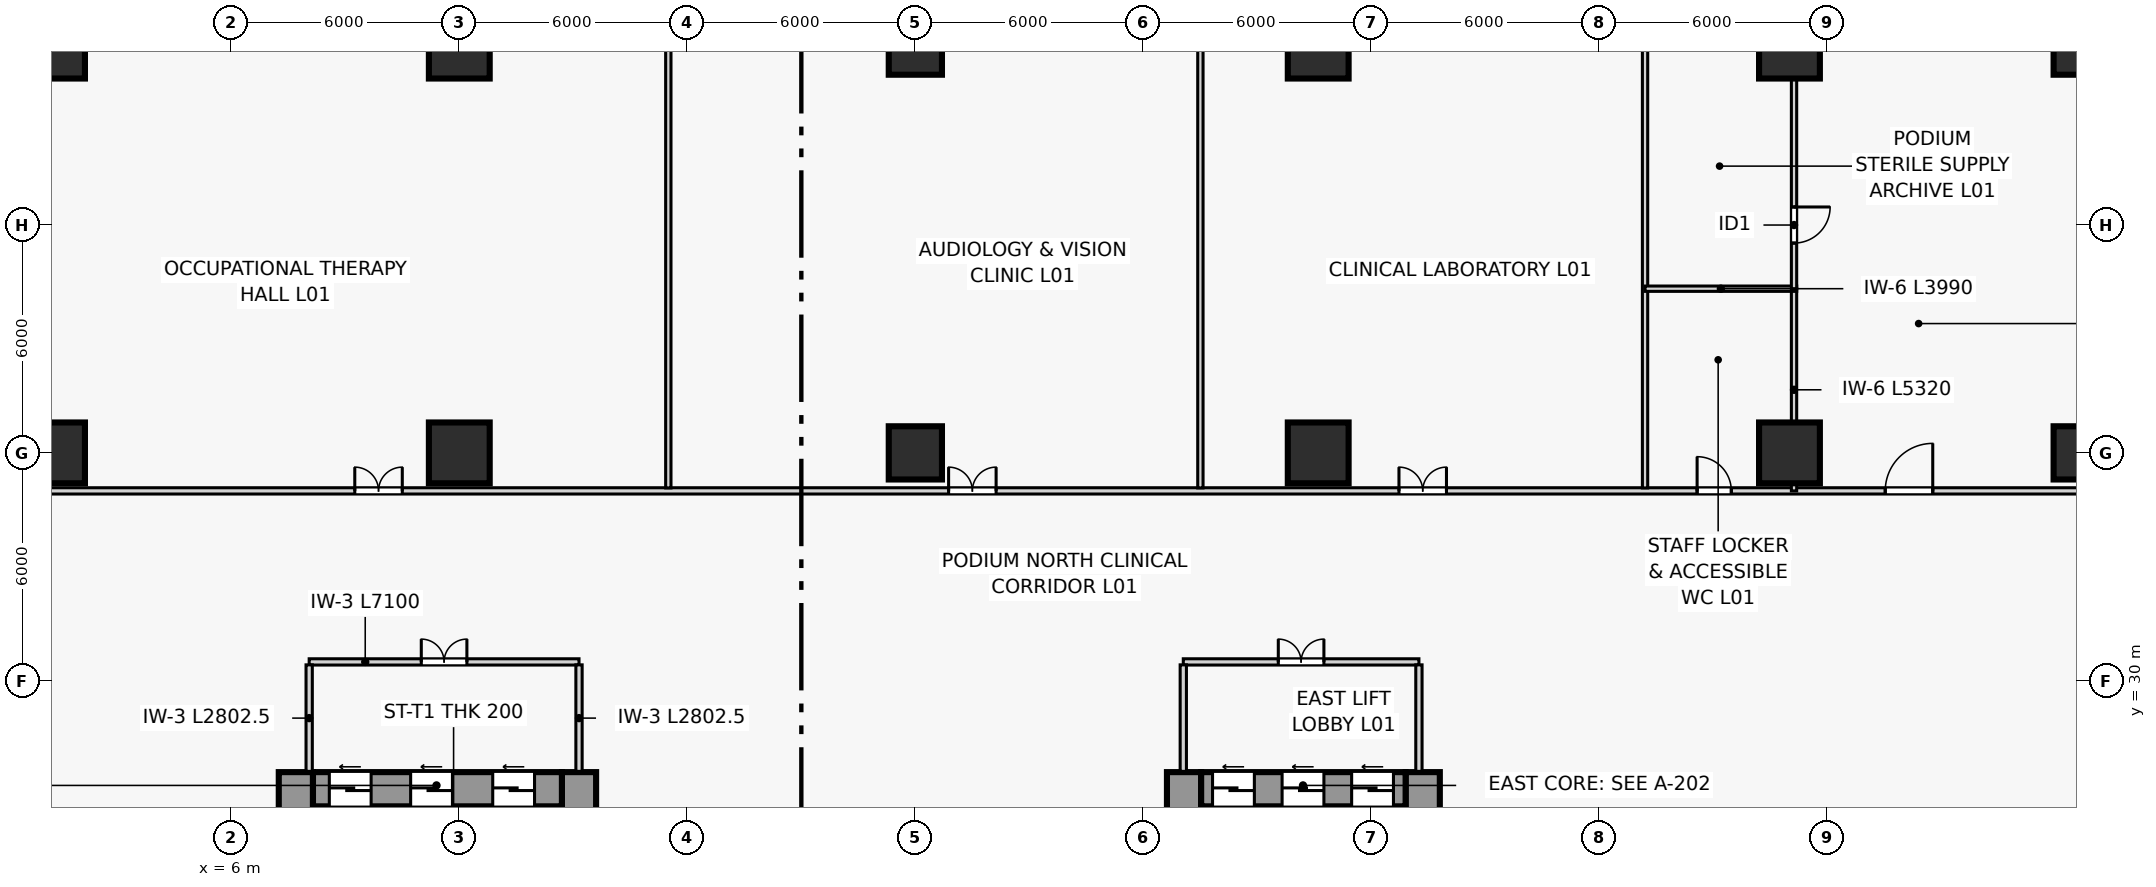
"""IFC4 building model, lengths in metres.
Left out: names, types, materials, properties, quantities, classifications, styles, units other than length and angle.
Written with IfcOpenShell. Run it as: python <this file> out.ifc"""

import sys

from ifc_helpers import new_model, si_unit, direction, frame, frame_2d, origin, origin_2d, place, context, subcontext, project, spatial, rectangle, extrude, source, transform, mapped, element, fill, save


model = new_model("IFC4")
c1 = context("Model", 3, precision=1e-05, world=origin(), true_north=direction((0.0, 1.0)))
c2 = subcontext(c1, "Body", "Model", "MODEL_VIEW")
j1 = project(units=[si_unit("LENGTHUNIT", "METRE"), si_unit("PLANEANGLEUNIT", "RADIAN")], contexts=[c1])
p1 = place(None, origin())
s1 = spatial("IfcSite", under=j1, at=p1, CompositionType="ELEMENT")
p2 = place(p1, origin())
s2 = spatial("IfcBuilding", under=s1, at=p2, CompositionType="ELEMENT")
p3 = place(p2, frame((0.0, 0.0, 4.5)))
s3 = spatial("IfcBuildingStorey", under=s2, at=p3, CompositionType="ELEMENT", Elevation=4.5)
p4 = place(p3, frame((7.7, 14.45, 0.0), z_axis=(0.0, 0.0, 1.0), x_axis=(0.0, 1.0, 0.0)))
e1 = element("IfcWall", 1, at=p4, inside=s3, PredefinedType="SHEAR", context=c2, shape_type="SweptSolid", body=[
    extrude(rectangle(XDim=13.15, YDim=0.9, at=frame_2d((6.575, 0.0))), origin(), (0.0, 0.0, 1.0), 4.5),
])
p5 = place(p3, frame((15.15, 14.45, 0.0), z_axis=(0.0, 0.0, 1.0), x_axis=(0.0, 1.0, 0.0)))
e2 = element("IfcWall", 2, at=p5, inside=s3, PredefinedType="SHEAR", context=c2, shape_type="SweptSolid", body=[
    extrude(rectangle(XDim=13.15, YDim=0.9, at=frame_2d((6.575, 0.0))), origin(), (0.0, 0.0, 1.0), 4.5),
])
p6 = place(p5, frame((5.65, 0.0, 0.0)))
e3 = element("IfcOpeningElement", 3, at=p6, cuts=e2, PredefinedType="OPENING", context=c2, shape_type="SweptSolid", body=[
    extrude(rectangle(XDim=1.1, YDim=2.2, at=frame_2d((0.55, 1.1))), frame((0.0, 0.46, 0.0), z_axis=(0.0, -1.0, 0.0), x_axis=(1.0, 0.0, 0.0)), (0.0, 0.0, 1.0), 0.92),
])
p7 = place(p3, frame((8.15, 27.15, 0.0), z_axis=(0.0, 0.0, 1.0), x_axis=(1.0, 0.0, 0.0)))
e4 = element("IfcWall", 4, at=p7, inside=s3, PredefinedType="SHEAR", context=c2, shape_type="SweptSolid", body=[
    extrude(rectangle(XDim=6.55, YDim=0.9, at=frame_2d((3.275, 0.0))), origin(), (0.0, 0.0, 1.0), 4.5),
])
p8 = place(p7, frame((0.43, 0.0, 0.0)))
e5 = element("IfcOpeningElement", 5, at=p8, cuts=e4, PredefinedType="OPENING", context=c2, shape_type="SweptSolid", body=[
    extrude(rectangle(XDim=1.1, YDim=2.2, at=frame_2d((0.55, 1.1))), frame((0.0, 0.46, 0.0), z_axis=(0.0, -1.0, 0.0), x_axis=(1.0, 0.0, 0.0)), (0.0, 0.0, 1.0), 0.92),
])
p9 = place(p7, frame((2.57, 0.0, 0.0)))
e6 = element("IfcOpeningElement", 6, at=p9, cuts=e4, PredefinedType="OPENING", context=c2, shape_type="SweptSolid", body=[
    extrude(rectangle(XDim=1.1, YDim=2.2, at=frame_2d((0.55, 1.1))), frame((0.0, 0.46, 0.0), z_axis=(0.0, -1.0, 0.0), x_axis=(1.0, 0.0, 0.0)), (0.0, 0.0, 1.0), 0.92),
])
p10 = place(p7, frame((4.73, 0.0, 0.0)))
e7 = element("IfcOpeningElement", 7, at=p10, cuts=e4, PredefinedType="OPENING", context=c2, shape_type="SweptSolid", body=[
    extrude(rectangle(XDim=1.1, YDim=2.2, at=frame_2d((0.55, 1.1))), frame((0.0, 0.46, 0.0), z_axis=(0.0, -1.0, 0.0), x_axis=(1.0, 0.0, 0.0)), (0.0, 0.0, 1.0), 0.92),
])
p11 = place(p3, frame((31.07, 14.45, 0.0), z_axis=(0.0, 0.0, 1.0), x_axis=(0.0, 1.0, 0.0)))
e8 = element("IfcWall", 8, at=p11, inside=s3, PredefinedType="SHEAR", context=c2, shape_type="SweptSolid", body=[
    extrude(rectangle(XDim=13.15, YDim=0.9, at=frame_2d((6.575, 0.0))), origin(), (0.0, 0.0, 1.0), 4.5),
])
p12 = place(p3, frame((37.35, 14.45, 0.0), z_axis=(0.0, 0.0, 1.0), x_axis=(0.0, 1.0, 0.0)))
e9 = element("IfcWall", 9, at=p12, inside=s3, PredefinedType="SHEAR", context=c2, shape_type="SweptSolid", body=[
    extrude(rectangle(XDim=13.15, YDim=0.9, at=frame_2d((6.575, 0.0))), origin(), (0.0, 0.0, 1.0), 4.5),
])
p13 = place(p12, frame((5.65, 0.0, 0.0)))
e10 = element("IfcOpeningElement", 10, at=p13, cuts=e9, PredefinedType="OPENING", context=c2, shape_type="SweptSolid", body=[
    extrude(rectangle(XDim=1.1, YDim=2.2, at=frame_2d((0.55, 1.1))), frame((0.0, 0.46, 0.0), z_axis=(0.0, -1.0, 0.0), x_axis=(1.0, 0.0, 0.0)), (0.0, 0.0, 1.0), 0.92),
])
p14 = place(p3, frame((31.52, 27.15, 0.0), z_axis=(0.0, 0.0, 1.0), x_axis=(1.0, 0.0, 0.0)))
e11 = element("IfcWall", 11, at=p14, inside=s3, PredefinedType="SHEAR", context=c2, shape_type="SweptSolid", body=[
    extrude(rectangle(XDim=5.38, YDim=0.9, at=frame_2d((2.69, 0.0))), origin(), (0.0, 0.0, 1.0), 4.5),
])
p15 = place(p14, frame((0.3, 0.0, 0.0)))
e12 = element("IfcOpeningElement", 12, at=p15, cuts=e11, PredefinedType="OPENING", context=c2, shape_type="SweptSolid", body=[
    extrude(rectangle(XDim=1.1, YDim=2.2, at=frame_2d((0.55, 1.1))), frame((0.0, 0.46, 0.0), z_axis=(0.0, -1.0, 0.0), x_axis=(1.0, 0.0, 0.0)), (0.0, 0.0, 1.0), 0.92),
])
p16 = place(p14, frame((2.13, 0.0, 0.0)))
e13 = element("IfcOpeningElement", 13, at=p16, cuts=e11, PredefinedType="OPENING", context=c2, shape_type="SweptSolid", body=[
    extrude(rectangle(XDim=1.1, YDim=2.2, at=frame_2d((0.55, 1.1))), frame((0.0, 0.46, 0.0), z_axis=(0.0, -1.0, 0.0), x_axis=(1.0, 0.0, 0.0)), (0.0, 0.0, 1.0), 0.92),
])
p17 = place(p14, frame((3.96, 0.0, 0.0)))
e14 = element("IfcOpeningElement", 14, at=p17, cuts=e11, PredefinedType="OPENING", context=c2, shape_type="SweptSolid", body=[
    extrude(rectangle(XDim=1.1, YDim=2.2, at=frame_2d((0.55, 1.1))), frame((0.0, 0.46, 0.0), z_axis=(0.0, -1.0, 0.0), x_axis=(1.0, 0.0, 0.0)), (0.0, 0.0, 1.0), 0.92),
])
m1 = source(origin(), c2, "Body", "SweptSolid", [
    extrude(rectangle(XDim=1.6, YDim=1.6, at=origin_2d()), origin(), (0.0, 0.0, 1.0), 4.5),
])
for number, where, z_axis, x_axis in (
    (15, (1.35, 36.0, 0.0), (0.0, 0.0, 1.0), (1.0, 0.0, 0.0)),
    (16, (1.35, 46.65, 0.0), (0.0, 0.0, 1.0), (1.0, 0.0, 0.0)),
    (17, (12.0, 36.0, 0.0), (0.0, 0.0, 1.0), (1.0, 0.0, 0.0)),
    (18, (12.0, 46.65, 0.0), (0.0, 0.0, 1.0), (1.0, 0.0, 0.0)),
):
    element("IfcColumn", number, at=place(p3, frame(where, z_axis=z_axis, x_axis=x_axis)), inside=s3, PredefinedType="COLUMN", context=c2, shape_type="MappedRepresentation", body=[
        mapped(m1, transform((0.0, 0.0, 0.0), scale=1.0)),
    ])
m2 = source(origin(), c2, "Body", "SweptSolid", [
    extrude(rectangle(XDim=1.4, YDim=1.4, at=origin_2d()), origin(), (0.0, 0.0, 1.0), 4.5),
])
for number, where, z_axis, x_axis in (
    (19, (24.0, 36.0, 0.0), (0.0, 0.0, 1.0), (1.0, 0.0, 0.0)),
    (20, (24.0, 46.65, 0.0), (0.0, 0.0, 1.0), (1.0, 0.0, 0.0)),
):
    element("IfcColumn", number, at=place(p3, frame(where, z_axis=z_axis, x_axis=x_axis)), inside=s3, PredefinedType="COLUMN", context=c2, shape_type="MappedRepresentation", body=[
        mapped(m2, transform((0.0, 0.0, 0.0), scale=1.0)),
    ])
for number, where, z_axis, x_axis in (
    (21, (34.6, 36.0, 0.0), (0.0, 0.0, 1.0), (1.0, 0.0, 0.0)),
    (22, (34.6, 46.65, 0.0), (0.0, 0.0, 1.0), (1.0, 0.0, 0.0)),
    (23, (47.0, 36.0, 0.0), (0.0, 0.0, 1.0), (1.0, 0.0, 0.0)),
    (24, (47.0, 46.65, 0.0), (0.0, 0.0, 1.0), (1.0, 0.0, 0.0)),
):
    element("IfcColumn", number, at=place(p3, frame(where, z_axis=z_axis, x_axis=x_axis)), inside=s3, PredefinedType="COLUMN", context=c2, shape_type="MappedRepresentation", body=[
        mapped(m1, transform((0.0, 0.0, 0.0), scale=1.0)),
    ])
for number, where, z_axis, x_axis in (
    (25, (54.65, 36.0, 0.0), (0.0, 0.0, 1.0), (1.0, 0.0, 0.0)),
    (26, (54.65, 46.65, 0.0), (0.0, 0.0, 1.0), (1.0, 0.0, 0.0)),
):
    element("IfcColumn", number, at=place(p3, frame(where, z_axis=z_axis, x_axis=x_axis)), inside=s3, PredefinedType="COLUMN", context=c2, shape_type="MappedRepresentation", body=[
        mapped(m2, transform((0.0, 0.0, 0.0), scale=1.0)),
    ])
for number, where, z_axis, x_axis in (
    (27, (10.2, 24.345, 0.0), (0.0, 0.0, 1.0), (0.0, 1.0, 0.0)),
    (28, (12.35, 24.345, 0.0), (0.0, 0.0, 1.0), (0.0, 1.0, 0.0)),
    (29, (33.29, 24.345, 0.0), (0.0, 0.0, 1.0), (0.0, 1.0, 0.0)),
    (30, (35.11, 24.345, 0.0), (0.0, 0.0, 1.0), (0.0, 1.0, 0.0)),
):
    element("IfcWall", number, at=place(p3, frame(where, z_axis=z_axis, x_axis=x_axis)), inside=s3, PredefinedType="PARTITIONING", context=c2, shape_type="SweptSolid", body=[
        extrude(rectangle(XDim=2.335, YDim=0.24, at=frame_2d((1.167, 0.0))), origin(), (0.0, 0.0, 1.0), 4.16),
    ])
p18 = place(p3, frame((8.05, 30.5, 0.0), z_axis=(0.0, 0.0, 1.0), x_axis=(1.0, 0.0, 0.0)))
e31 = element("IfcWall", 31, at=p18, inside=s3, PredefinedType="PARTITIONING", context=c2, shape_type="SweptSolid", body=[
    extrude(rectangle(XDim=7.1, YDim=0.165, at=frame_2d((3.55, 0.0))), origin(), (0.0, 0.0, 1.0), 4.16),
])
p19 = place(p18, frame((2.95, 0.0, 0.0)))
e32 = element("IfcOpeningElement", 32, at=p19, cuts=e31, PredefinedType="OPENING", context=c2, shape_type="SweptSolid", body=[
    extrude(rectangle(XDim=1.2, YDim=2.2, at=frame_2d((0.6, 1.1))), frame((0.0, 0.093, 0.0), z_axis=(0.0, -1.0, 0.0), x_axis=(1.0, 0.0, 0.0)), (0.0, 0.0, 1.0), 0.185),
])
for number, where, z_axis, x_axis in (
    (33, (8.05, 27.62, 0.0), (0.0, 0.0, 1.0), (0.0, 1.0, 0.0)),
    (34, (15.15, 27.62, 0.0), (0.0, 0.0, 1.0), (0.0, 1.0, 0.0)),
):
    element("IfcWall", number, at=place(p3, frame(where, z_axis=z_axis, x_axis=x_axis)), inside=s3, PredefinedType="PARTITIONING", context=c2, shape_type="SweptSolid", body=[
        extrude(rectangle(XDim=2.802, YDim=0.165, at=frame_2d((1.401, 0.0))), origin(), (0.0, 0.0, 1.0), 4.16),
    ])
p20 = place(p3, frame((31.05, 30.5, 0.0), z_axis=(0.0, 0.0, 1.0), x_axis=(1.0, 0.0, 0.0)))
e35 = element("IfcWall", 35, at=p20, inside=s3, PredefinedType="PARTITIONING", context=c2, shape_type="SweptSolid", body=[
    extrude(rectangle(XDim=6.2, YDim=0.165, at=frame_2d((3.1, 0.0))), origin(), (0.0, 0.0, 1.0), 4.16),
])
p21 = place(p20, frame((2.5, 0.0, 0.0)))
e36 = element("IfcOpeningElement", 36, at=p21, cuts=e35, PredefinedType="OPENING", context=c2, shape_type="SweptSolid", body=[
    extrude(rectangle(XDim=1.2, YDim=2.2, at=frame_2d((0.6, 1.1))), frame((0.0, 0.093, 0.0), z_axis=(0.0, -1.0, 0.0), x_axis=(1.0, 0.0, 0.0)), (0.0, 0.0, 1.0), 0.185),
])
for number, where, z_axis, x_axis in (
    (37, (31.05, 27.62, 0.0), (0.0, 0.0, 1.0), (0.0, 1.0, 0.0)),
    (38, (37.25, 27.62, 0.0), (0.0, 0.0, 1.0), (0.0, 1.0, 0.0)),
):
    element("IfcWall", number, at=place(p3, frame(where, z_axis=z_axis, x_axis=x_axis)), inside=s3, PredefinedType="PARTITIONING", context=c2, shape_type="SweptSolid", body=[
        extrude(rectangle(XDim=2.802, YDim=0.165, at=frame_2d((1.401, 0.0))), origin(), (0.0, 0.0, 1.0), 4.16),
    ])
p22 = place(p3, frame((0.185, 35.0, 0.0), z_axis=(0.0, 0.0, 1.0), x_axis=(1.0, 0.0, 0.0)))
e39 = element("IfcWall", 39, at=p22, inside=s3, PredefinedType="PARTITIONING", context=c2, shape_type="SweptSolid", body=[
    extrude(rectangle(XDim=55.63, YDim=0.165, at=frame_2d((27.815, 0.0))), origin(), (0.0, 0.0, 1.0), 4.16),
])
p23 = place(p22, frame((9.065, 0.0, 0.0)))
e40 = element("IfcOpeningElement", 40, at=p23, cuts=e39, PredefinedType="OPENING", context=c2, shape_type="SweptSolid", body=[
    extrude(rectangle(XDim=1.25, YDim=2.2, at=frame_2d((0.625, 1.1))), frame((0.0, 0.093, 0.0), z_axis=(0.0, -1.0, 0.0), x_axis=(1.0, 0.0, 0.0)), (0.0, 0.0, 1.0), 0.185),
])
p24 = place(p22, frame((24.69, 0.0, 0.0)))
e41 = element("IfcOpeningElement", 41, at=p24, cuts=e39, PredefinedType="OPENING", context=c2, shape_type="SweptSolid", body=[
    extrude(rectangle(XDim=1.25, YDim=2.2, at=frame_2d((0.625, 1.1))), frame((0.0, 0.093, 0.0), z_axis=(0.0, -1.0, 0.0), x_axis=(1.0, 0.0, 0.0)), (0.0, 0.0, 1.0), 0.185),
])
p25 = place(p22, frame((36.54, 0.0, 0.0)))
e42 = element("IfcOpeningElement", 42, at=p25, cuts=e39, PredefinedType="OPENING", context=c2, shape_type="SweptSolid", body=[
    extrude(rectangle(XDim=1.25, YDim=2.2, at=frame_2d((0.625, 1.1))), frame((0.0, 0.093, 0.0), z_axis=(0.0, -1.0, 0.0), x_axis=(1.0, 0.0, 0.0)), (0.0, 0.0, 1.0), 0.185),
])
p26 = place(p22, frame((44.385, 0.0, 0.0)))
e43 = element("IfcOpeningElement", 43, at=p26, cuts=e39, PredefinedType="OPENING", context=c2, shape_type="SweptSolid", body=[
    extrude(rectangle(XDim=0.9, YDim=2.1, at=frame_2d((0.45, 1.05))), frame((0.0, 0.093, 0.0), z_axis=(0.0, -1.0, 0.0), x_axis=(1.0, 0.0, 0.0)), (0.0, 0.0, 1.0), 0.185),
])
p27 = place(p22, frame((49.335, 0.0, 0.0)))
e44 = element("IfcOpeningElement", 44, at=p27, cuts=e39, PredefinedType="OPENING", context=c2, shape_type="SweptSolid", body=[
    extrude(rectangle(XDim=1.25, YDim=2.2, at=frame_2d((0.625, 1.1))), frame((0.0, 0.093, 0.0), z_axis=(0.0, -1.0, 0.0), x_axis=(1.0, 0.0, 0.0)), (0.0, 0.0, 1.0), 0.185),
])
for number, where, z_axis, x_axis in (
    (45, (17.5, 35.077, 0.0), (0.0, 0.0, 1.0), (0.0, 1.0, 0.0)),
    (46, (31.5, 35.077, 0.0), (0.0, 0.0, 1.0), (0.0, 1.0, 0.0)),
    (47, (43.2, 35.077, 0.0), (0.0, 0.0, 1.0), (0.0, 1.0, 0.0)),
):
    element("IfcWall", number, at=place(p3, frame(where, z_axis=z_axis, x_axis=x_axis)), inside=s3, PredefinedType="PARTITIONING", context=c2, shape_type="SweptSolid", body=[
        extrude(rectangle(XDim=12.738, YDim=0.14, at=frame_2d((6.369, 0.0))), origin(), (0.0, 0.0, 1.0), 4.16),
    ])
p28 = place(p3, frame((47.12, 35.0, 0.0), z_axis=(0.0, 0.0, 1.0), x_axis=(0.0, 1.0, 0.0)))
e48 = element("IfcWall", 48, at=p28, inside=s3, PredefinedType="PLUMBINGWALL", context=c2, shape_type="SweptSolid", body=[
    extrude(rectangle(XDim=5.32, YDim=0.14, at=frame_2d((2.66, 0.0))), origin(), (0.0, 0.0, 1.0), 3.305),
])
p29 = place(p3, frame((43.2, 40.32, 0.0), z_axis=(0.0, 0.0, 1.0), x_axis=(1.0, 0.0, 0.0)))
e49 = element("IfcWall", 49, at=p29, inside=s3, PredefinedType="PLUMBINGWALL", context=c2, shape_type="SweptSolid", body=[
    extrude(rectangle(XDim=3.99, YDim=0.14, at=frame_2d((1.995, 0.0))), origin(), (0.0, 0.0, 1.0), 4.16),
])
p30 = place(p3, frame((47.12, 40.32, 0.0), z_axis=(0.0, 0.0, 1.0), x_axis=(0.0, 1.0, 0.0)))
e50 = element("IfcWall", 50, at=p30, inside=s3, PredefinedType="PARTITIONING", context=c2, shape_type="SweptSolid", body=[
    extrude(rectangle(XDim=7.495, YDim=0.14, at=frame_2d((3.748, 0.0))), origin(), (0.0, 0.0, 1.0), 3.305),
])
p31 = place(p30, frame((1.2, 0.0, 0.0)))
e51 = element("IfcOpeningElement", 51, at=p31, cuts=e50, PredefinedType="OPENING", context=c2, shape_type="SweptSolid", body=[
    extrude(rectangle(XDim=0.95, YDim=2.1, at=frame_2d((0.475, 1.05))), frame((0.0, 0.08, 0.0), z_axis=(0.0, -1.0, 0.0), x_axis=(1.0, 0.0, 0.0)), (0.0, 0.0, 1.0), 0.16),
])
m3 = source(origin(), c2, "Body", "SweptSolid", [
    extrude(rectangle(XDim=1.1, YDim=2.2, at=frame_2d((0.55, 1.1))), frame((0.0, 0.025, 0.0), z_axis=(0.0, -1.0, 0.0), x_axis=(1.0, 0.0, 0.0)), (0.0, 0.0, 1.0), 0.05),
])
p32 = place(p8, origin())
e52 = element("IfcDoor", 52, at=p32, inside=s3, OperationType="SLIDING_TO_LEFT", PredefinedType="DOOR", context=c2, shape_type="MappedRepresentation", body=[
    mapped(m3, transform((0.0, 0.0, 0.0), scale=1.0)),
])
fill(e5, e52)
p33 = place(p9, origin())
e53 = element("IfcDoor", 53, at=p33, inside=s3, OperationType="SLIDING_TO_LEFT", PredefinedType="DOOR", context=c2, shape_type="MappedRepresentation", body=[
    mapped(m3, transform((0.0, 0.0, 0.0), scale=1.0)),
])
fill(e6, e53)
p34 = place(p10, origin())
e54 = element("IfcDoor", 54, at=p34, inside=s3, OperationType="SLIDING_TO_LEFT", PredefinedType="DOOR", context=c2, shape_type="MappedRepresentation", body=[
    mapped(m3, transform((0.0, 0.0, 0.0), scale=1.0)),
])
fill(e7, e54)
p35 = place(p15, origin())
e55 = element("IfcDoor", 55, at=p35, inside=s3, OperationType="SLIDING_TO_LEFT", PredefinedType="DOOR", context=c2, shape_type="MappedRepresentation", body=[
    mapped(m3, transform((0.0, 0.0, 0.0), scale=1.0)),
])
fill(e12, e55)
p36 = place(p16, origin())
e56 = element("IfcDoor", 56, at=p36, inside=s3, OperationType="SLIDING_TO_LEFT", PredefinedType="DOOR", context=c2, shape_type="MappedRepresentation", body=[
    mapped(m3, transform((0.0, 0.0, 0.0), scale=1.0)),
])
fill(e13, e56)
p37 = place(p17, origin())
e57 = element("IfcDoor", 57, at=p37, inside=s3, OperationType="SLIDING_TO_LEFT", PredefinedType="DOOR", context=c2, shape_type="MappedRepresentation", body=[
    mapped(m3, transform((0.0, 0.0, 0.0), scale=1.0)),
])
fill(e14, e57)
m4 = source(origin(), c2, "Body", "SweptSolid", [
    extrude(rectangle(XDim=1.2, YDim=2.2, at=frame_2d((0.6, 1.1))), frame((0.0, 0.025, 0.0), z_axis=(0.0, -1.0, 0.0), x_axis=(1.0, 0.0, 0.0)), (0.0, 0.0, 1.0), 0.05),
])
p38 = place(p19, origin())
e58 = element("IfcDoor", 58, at=p38, inside=s3, OperationType="DOUBLE_DOOR_SINGLE_SWING", PredefinedType="DOOR", context=c2, shape_type="MappedRepresentation", body=[
    mapped(m4, transform((0.0, 0.0, 0.0), scale=1.0)),
])
fill(e32, e58)
p39 = place(p21, origin())
e59 = element("IfcDoor", 59, at=p39, inside=s3, OperationType="DOUBLE_DOOR_SINGLE_SWING", PredefinedType="DOOR", context=c2, shape_type="MappedRepresentation", body=[
    mapped(m4, transform((0.0, 0.0, 0.0), scale=1.0)),
])
fill(e36, e59)
m5 = source(origin(), c2, "Body", "SweptSolid", [
    extrude(rectangle(XDim=1.25, YDim=2.2, at=frame_2d((0.625, 1.1))), frame((0.0, 0.025, 0.0), z_axis=(0.0, -1.0, 0.0), x_axis=(1.0, 0.0, 0.0)), (0.0, 0.0, 1.0), 0.05),
])
p40 = place(p23, origin())
e60 = element("IfcDoor", 60, at=p40, inside=s3, OperationType="DOUBLE_DOOR_SINGLE_SWING", PredefinedType="DOOR", context=c2, shape_type="MappedRepresentation", body=[
    mapped(m5, transform((0.0, 0.0, 0.0), scale=1.0)),
])
fill(e40, e60)
p41 = place(p24, origin())
e61 = element("IfcDoor", 61, at=p41, inside=s3, OperationType="DOUBLE_DOOR_SINGLE_SWING", PredefinedType="DOOR", context=c2, shape_type="MappedRepresentation", body=[
    mapped(m5, transform((0.0, 0.0, 0.0), scale=1.0)),
])
fill(e41, e61)
p42 = place(p25, origin())
e62 = element("IfcDoor", 62, at=p42, inside=s3, OperationType="DOUBLE_DOOR_SINGLE_SWING", PredefinedType="DOOR", context=c2, shape_type="MappedRepresentation", body=[
    mapped(m5, transform((0.0, 0.0, 0.0), scale=1.0)),
])
fill(e42, e62)
m6 = source(origin(), c2, "Body", "SweptSolid", [
    extrude(rectangle(XDim=0.9, YDim=2.1, at=frame_2d((0.45, 1.05))), frame((0.0, 0.025, 0.0), z_axis=(0.0, -1.0, 0.0), x_axis=(1.0, 0.0, 0.0)), (0.0, 0.0, 1.0), 0.05),
])
p43 = place(p26, origin())
e63 = element("IfcDoor", 63, at=p43, inside=s3, OperationType="SINGLE_SWING_LEFT", PredefinedType="DOOR", context=c2, shape_type="MappedRepresentation", body=[
    mapped(m6, transform((0.0, 0.0, 0.0), scale=1.0)),
])
fill(e43, e63)
p44 = place(p27, origin())
e64 = element("IfcDoor", 64, at=p44, inside=s3, OperationType="SINGLE_SWING_RIGHT", PredefinedType="DOOR", context=c2, shape_type="MappedRepresentation", body=[
    mapped(m5, transform((0.0, 0.0, 0.0), scale=1.0)),
])
fill(e44, e64)
m7 = source(origin(), c2, "Body", "SweptSolid", [
    extrude(rectangle(XDim=0.95, YDim=2.1, at=frame_2d((0.475, 1.05))), frame((0.0, 0.025, 0.0), z_axis=(0.0, -1.0, 0.0), x_axis=(1.0, 0.0, 0.0)), (0.0, 0.0, 1.0), 0.05),
])
p45 = place(p31, frame((0.95, 0.0, 0.0), z_axis=(0.0, 0.0, 1.0), x_axis=(-1.0, 0.0, 0.0)))
e65 = element("IfcDoor", 65, at=p45, inside=s3, OperationType="SINGLE_SWING_LEFT", PredefinedType="DOOR", context=c2, shape_type="MappedRepresentation", body=[
    mapped(m7, transform((0.0, 0.0, 0.0), scale=1.0)),
])
fill(e51, e65)
save(model, sys.argv[1])
